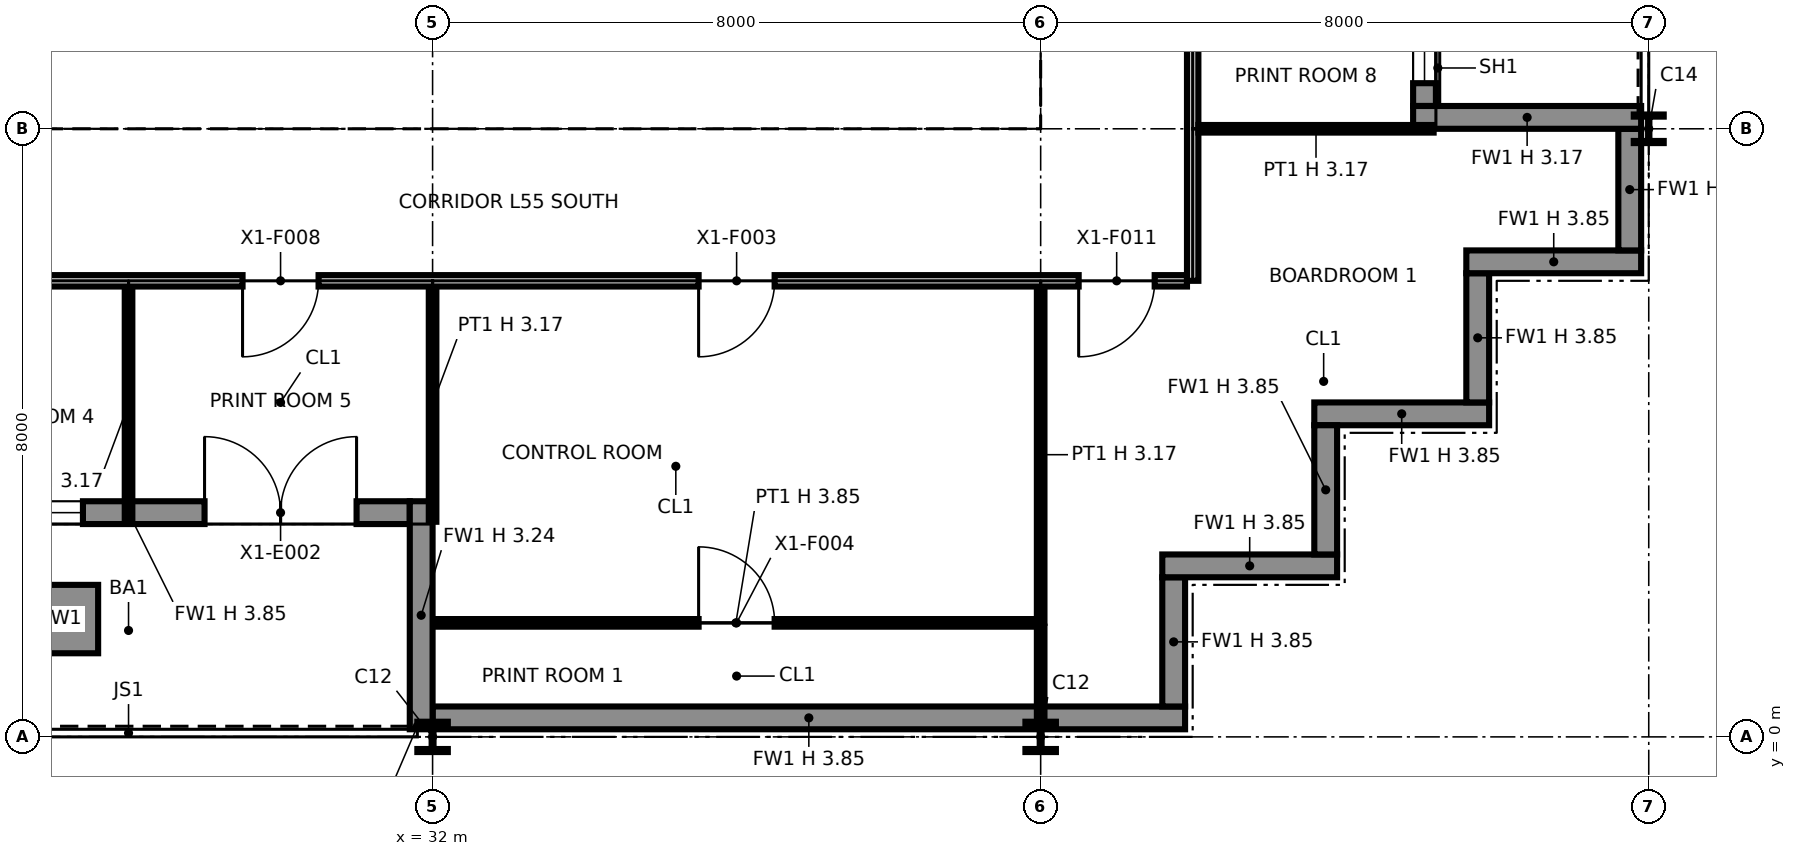
"""IFC4 building model, lengths in metres.
Left out: names, types, materials, properties, quantities, classifications, styles, units other than length and angle.
Written with IfcOpenShell. Run it as: python <this file> out.ifc"""

import sys

from ifc_helpers import new_model, si_unit, direction, frame, frame_2d, origin, origin_2d, place, context, subcontext, project, spatial, polyline, rectangle, i_section, outline, extrude, element, fill, save


model = new_model("IFC4")
c1 = context("Model", 3, precision=1e-05, world=origin(), true_north=direction((0.0, 1.0)))
c2 = subcontext(c1, "Body", "Model", "MODEL_VIEW")
j1 = project(units=[si_unit("LENGTHUNIT", "METRE"), si_unit("PLANEANGLEUNIT", "RADIAN")], contexts=[c1])
p1 = place(None, origin())
s1 = spatial("IfcSite", under=j1, at=p1, CompositionType="ELEMENT")
p2 = place(p1, origin())
s2 = spatial("IfcBuilding", under=s1, at=p2, CompositionType="ELEMENT")
p3 = place(p2, frame((0.0, 0.0, 255.0)))
s3 = spatial("IfcBuildingStorey", under=s2, at=p3, CompositionType="ELEMENT", Elevation=255.0)
p4 = place(p3, frame((32.0, 0.0, 0.0), z_axis=(0.0, 0.0, 1.0), x_axis=(1.0, 0.0, 0.0)))
e1 = element("IfcColumn", 1, at=p4, inside=s3, PredefinedType="COLUMN", context=c2, shape_type="SweptSolid", body=[
    extrude(i_section(OverallWidth=0.401, OverallDepth=0.399, WebThickness=0.025, FlangeThickness=0.04, at=origin_2d()), origin(), (0.0, 0.0, 1.0), 3.85),
])
p5 = place(p3, frame((32.0, 8.0, 0.0), z_axis=(0.0, 0.0, 1.0), x_axis=(1.0, 0.0, 0.0)))
e2 = element("IfcColumn", 2, at=p5, inside=s3, PredefinedType="COLUMN", context=c2, shape_type="SweptSolid", body=[
    extrude(i_section(OverallWidth=0.371, OverallDepth=0.361, WebThickness=0.012, FlangeThickness=0.02, at=origin_2d()), origin(), (0.0, 0.0, 1.0), 3.85),
])
p6 = place(p3, frame((40.0, 0.0, 0.0), z_axis=(0.0, 0.0, 1.0), x_axis=(1.0, 0.0, 0.0)))
e3 = element("IfcColumn", 3, at=p6, inside=s3, PredefinedType="COLUMN", context=c2, shape_type="SweptSolid", body=[
    extrude(i_section(OverallWidth=0.401, OverallDepth=0.399, WebThickness=0.025, FlangeThickness=0.04, at=origin_2d()), origin(), (0.0, 0.0, 1.0), 3.85),
])
p7 = place(p3, frame((40.0, 8.0, 0.0), z_axis=(0.0, 0.0, 1.0), x_axis=(1.0, 0.0, 0.0)))
e4 = element("IfcColumn", 4, at=p7, inside=s3, PredefinedType="COLUMN", context=c2, shape_type="SweptSolid", body=[
    extrude(i_section(OverallWidth=0.371, OverallDepth=0.361, WebThickness=0.012, FlangeThickness=0.02, at=origin_2d()), origin(), (0.0, 0.0, 1.0), 3.85),
])
p8 = place(p3, frame((48.0, 8.0, 0.0), z_axis=(0.0, 0.0, 1.0), x_axis=(1.0, 0.0, 0.0)))
e5 = element("IfcColumn", 5, at=p8, inside=s3, PredefinedType="COLUMN", context=c2, shape_type="SweptSolid", body=[
    extrude(i_section(OverallWidth=0.394, OverallDepth=0.376, WebThickness=0.017, FlangeThickness=0.028, at=origin_2d()), origin(), (0.0, 0.0, 1.0), 3.85),
])
p9 = place(p3, frame((24.3, 2.95, 0.0), z_axis=(0.0, 0.0, 1.0), x_axis=(1.0, 0.0, 0.0)))
e6 = element("IfcWall", 6, at=p9, inside=s3, PredefinedType="SOLIDWALL", context=c2, shape_type="SweptSolid", body=[
    extrude(rectangle(XDim=7.4, YDim=0.3, at=frame_2d((3.7, 0.0))), origin(), (0.0, 0.0, 1.0), 3.85),
])
p10 = place(p9, frame((0.3, 0.0, 0.9)))
e7 = element("IfcOpeningElement", 7, at=p10, cuts=e6, PredefinedType="OPENING", context=c2, shape_type="SweptSolid", body=[
    extrude(rectangle(XDim=2.8, YDim=2.2, at=frame_2d((1.4, 1.1))), frame((0.0, 0.16, 0.0), z_axis=(0.0, -1.0, 0.0), x_axis=(1.0, 0.0, 0.0)), (0.0, 0.0, 1.0), 0.32),
])
p11 = place(p9, frame((4.7, 0.0, 0.0)))
e8 = element("IfcOpeningElement", 8, at=p11, cuts=e6, PredefinedType="OPENING", context=c2, shape_type="SweptSolid", body=[
    extrude(rectangle(XDim=2.0, YDim=2.4, at=frame_2d((1.0, 1.2))), frame((0.0, 0.16, 0.0), z_axis=(0.0, -1.0, 0.0), x_axis=(1.0, 0.0, 0.0)), (0.0, 0.0, 1.0), 0.32),
])
p12 = place(p3, frame((31.85, 0.1, 0.0), z_axis=(0.0, 0.0, 1.0), x_axis=(0.0, 1.0, 0.0)))
e9 = element("IfcWall", 9, at=p12, inside=s3, PredefinedType="SOLIDWALL", context=c2, shape_type="SweptSolid", body=[
    extrude(rectangle(XDim=3.0, YDim=0.3, at=frame_2d((1.5, 0.0))), origin(), (0.0, 0.0, 1.0), 3.237),
])
p13 = place(p3, frame((32.0, 0.25, 0.0), z_axis=(0.0, 0.0, 1.0), x_axis=(1.0, 0.0, 0.0)))
e10 = element("IfcWall", 10, at=p13, inside=s3, PredefinedType="SOLIDWALL", context=c2, shape_type="SweptSolid", body=[
    extrude(rectangle(XDim=9.9, YDim=0.3, at=frame_2d((4.95, 0.0))), origin(), (0.0, 0.0, 1.0), 3.85),
])
p14 = place(p3, frame((24.4, 1.55, 0.0), z_axis=(0.0, 0.0, 1.0), x_axis=(1.0, 0.0, 0.0)))
e11 = element("IfcWall", 11, at=p14, inside=s3, PredefinedType="SOLIDWALL", context=c2, shape_type="SweptSolid", body=[
    extrude(rectangle(XDim=3.2, YDim=0.9, at=frame_2d((1.6, 0.0))), origin(), (0.0, 0.0, 1.0), 0.6),
])
p15 = place(p3, frame((41.75, 0.4, 0.0), z_axis=(0.0, 0.0, 1.0), x_axis=(0.0, 1.0, 0.0)))
e12 = element("IfcWall", 12, at=p15, inside=s3, PredefinedType="SOLIDWALL", context=c2, shape_type="SweptSolid", body=[
    extrude(rectangle(XDim=1.7, YDim=0.3, at=frame_2d((0.85, 0.0))), origin(), (0.0, 0.0, 1.0), 3.85),
])
p16 = place(p3, frame((41.6, 2.25, 0.0), z_axis=(0.0, 0.0, 1.0), x_axis=(1.0, 0.0, 0.0)))
e13 = element("IfcWall", 13, at=p16, inside=s3, PredefinedType="SOLIDWALL", context=c2, shape_type="SweptSolid", body=[
    extrude(rectangle(XDim=2.3, YDim=0.3, at=frame_2d((1.15, 0.0))), origin(), (0.0, 0.0, 1.0), 3.85),
])
p17 = place(p3, frame((43.75, 2.4, 0.0), z_axis=(0.0, 0.0, 1.0), x_axis=(0.0, 1.0, 0.0)))
e14 = element("IfcWall", 14, at=p17, inside=s3, PredefinedType="SOLIDWALL", context=c2, shape_type="SweptSolid", body=[
    extrude(rectangle(XDim=1.7, YDim=0.3, at=frame_2d((0.85, 0.0))), origin(), (0.0, 0.0, 1.0), 3.85),
])
p18 = place(p3, frame((43.6, 4.25, 0.0), z_axis=(0.0, 0.0, 1.0), x_axis=(1.0, 0.0, 0.0)))
e15 = element("IfcWall", 15, at=p18, inside=s3, PredefinedType="SOLIDWALL", context=c2, shape_type="SweptSolid", body=[
    extrude(rectangle(XDim=2.3, YDim=0.3, at=frame_2d((1.15, 0.0))), origin(), (0.0, 0.0, 1.0), 3.85),
])
p19 = place(p3, frame((45.75, 4.4, 0.0), z_axis=(0.0, 0.0, 1.0), x_axis=(0.0, 1.0, 0.0)))
e16 = element("IfcWall", 16, at=p19, inside=s3, PredefinedType="SOLIDWALL", context=c2, shape_type="SweptSolid", body=[
    extrude(rectangle(XDim=1.7, YDim=0.3, at=frame_2d((0.85, 0.0))), origin(), (0.0, 0.0, 1.0), 3.85),
])
p20 = place(p3, frame((45.6, 6.25, 0.0), z_axis=(0.0, 0.0, 1.0), x_axis=(1.0, 0.0, 0.0)))
e17 = element("IfcWall", 17, at=p20, inside=s3, PredefinedType="SOLIDWALL", context=c2, shape_type="SweptSolid", body=[
    extrude(rectangle(XDim=2.3, YDim=0.3, at=frame_2d((1.15, 0.0))), origin(), (0.0, 0.0, 1.0), 3.85),
])
p21 = place(p3, frame((47.75, 6.4, 0.0), z_axis=(0.0, 0.0, 1.0), x_axis=(0.0, 1.0, 0.0)))
e18 = element("IfcWall", 18, at=p21, inside=s3, PredefinedType="SOLIDWALL", context=c2, shape_type="SweptSolid", body=[
    extrude(rectangle(XDim=1.6, YDim=0.3, at=frame_2d((0.8, 0.0))), origin(), (0.0, 0.0, 1.0), 3.85),
])
p22 = place(p3, frame((45.05, 8.3, 0.0), z_axis=(0.0, 0.0, 1.0), x_axis=(0.0, 1.0, 0.0)))
e19 = element("IfcWall", 19, at=p22, inside=s3, PredefinedType="SOLIDWALL", context=c2, shape_type="SweptSolid", body=[
    extrude(rectangle(XDim=7.4, YDim=0.3, at=frame_2d((3.7, 0.0))), origin(), (0.0, 0.0, 1.0), 3.85),
])
p23 = place(p22, frame((0.3, 0.0, 0.9)))
e20 = element("IfcOpeningElement", 20, at=p23, cuts=e19, PredefinedType="OPENING", context=c2, shape_type="SweptSolid", body=[
    extrude(rectangle(XDim=2.8, YDim=2.2, at=frame_2d((1.4, 1.1))), frame((0.0, 0.16, 0.0), z_axis=(0.0, -1.0, 0.0), x_axis=(1.0, 0.0, 0.0)), (0.0, 0.0, 1.0), 0.32),
])
p24 = place(p22, frame((4.7, 0.0, 0.0)))
e21 = element("IfcOpeningElement", 21, at=p24, cuts=e19, PredefinedType="OPENING", context=c2, shape_type="SweptSolid", body=[
    extrude(rectangle(XDim=2.0, YDim=2.4, at=frame_2d((1.0, 1.2))), frame((0.0, 0.16, 0.0), z_axis=(0.0, -1.0, 0.0), x_axis=(1.0, 0.0, 0.0)), (0.0, 0.0, 1.0), 0.32),
])
p25 = place(p3, frame((47.9, 8.15, 0.0), z_axis=(0.0, 0.0, 1.0), x_axis=(-1.0, 0.0, 0.0)))
e22 = element("IfcWall", 22, at=p25, inside=s3, PredefinedType="SOLIDWALL", context=c2, shape_type="SweptSolid", body=[
    extrude(rectangle(XDim=3.0, YDim=0.3, at=frame_2d((1.5, 0.0))), origin(), (0.0, 0.0, 1.0), 3.171),
])
p26 = place(p3, frame((24.65, 8.75, 0.0), z_axis=(0.0, 0.0, 1.0), x_axis=(1.0, 0.0, 0.0)))
e23 = element("IfcWall", 23, at=p26, inside=s3, PredefinedType="PARTITIONING", context=c2, shape_type="SweptSolid", body=[
    extrude(outline(polyline([(0.0, 0.0), (14.7, 0.0), (14.7, 3.85), (7.438, 3.85), (7.438, 3.308), (7.262, 3.308), (7.261, 3.85), (0.0, 3.85), (0.0, 0.0)])), frame((0.0, 0.1, 0.0), z_axis=(0.0, -1.0, 0.0), x_axis=(1.0, 0.0, 0.0)), (0.0, 0.0, 1.0), 0.2),
])
for number, where, z_axis, x_axis in (
    (24, (27.2, 8.85, 0.0), (0.0, 0.0, 1.0), (0.0, 1.0, 0.0)),
    (25, (29.5, 8.85, 0.0), (0.0, 0.0, 1.0), (0.0, 1.0, 0.0)),
):
    element("IfcWall", number, at=place(p3, frame(where, z_axis=z_axis, x_axis=x_axis)), inside=s3, PredefinedType="PARTITIONING", context=c2, shape_type="SweptSolid", body=[
        extrude(rectangle(XDim=2.55, YDim=0.2, at=frame_2d((1.275, 0.0))), origin(), (0.0, 0.0, 1.0), 3.85),
    ])
p27 = place(p3, frame((32.0, 8.85, 0.0), z_axis=(0.0, 0.0, 1.0), x_axis=(0.0, 1.0, 0.0)))
e26 = element("IfcWall", 26, at=p27, inside=s3, PredefinedType="PARTITIONING", context=c2, shape_type="SweptSolid", body=[
    extrude(rectangle(XDim=2.55, YDim=0.6, at=frame_2d((1.275, 0.0))), origin(), (0.0, 0.0, 1.0), 3.308),
])
for number, where, z_axis, x_axis in (
    (27, (35.6, 8.85, 0.0), (0.0, 0.0, 1.0), (0.0, 1.0, 0.0)),
    (28, (39.25, 8.85, 0.0), (0.0, 0.0, 1.0), (0.0, 1.0, 0.0)),
):
    element("IfcWall", number, at=place(p3, frame(where, z_axis=z_axis, x_axis=x_axis)), inside=s3, PredefinedType="PARTITIONING", context=c2, shape_type="SweptSolid", body=[
        extrude(rectangle(XDim=6.3, YDim=0.2, at=frame_2d((3.15, 0.0))), origin(), (0.0, 0.0, 1.0), 3.85),
    ])
p28 = place(p3, frame((40.0, 0.13, 0.0), z_axis=(0.0, 0.0, 1.0), x_axis=(0.0, 1.0, 0.0)))
e29 = element("IfcWall", 29, at=p28, inside=s3, PredefinedType="PARTITIONING", context=c2, shape_type="SweptSolid", body=[
    extrude(rectangle(XDim=1.32, YDim=0.1, at=frame_2d((0.66, 0.0))), origin(), (0.0, 0.0, 1.0), 3.172),
])
p29 = place(p3, frame((32.03, 1.5, 0.0), z_axis=(0.0, 0.0, 1.0), x_axis=(1.0, 0.0, 0.0)))
e30 = element("IfcWall", 30, at=p29, inside=s3, PredefinedType="PARTITIONING", context=c2, shape_type="SweptSolid", body=[
    extrude(rectangle(XDim=7.92, YDim=0.1, at=frame_2d((3.96, 0.0))), origin(), (0.0, 0.0, 1.0), 3.85),
])
p30 = place(p29, frame((3.47, 0.0, 0.0)))
e31 = element("IfcOpeningElement", 31, at=p30, cuts=e30, PredefinedType="OPENING", context=c2, shape_type="SweptSolid", body=[
    extrude(rectangle(XDim=1.0, YDim=2.1, at=frame_2d((0.5, 1.05))), frame((0.0, 0.06, 0.0), z_axis=(0.0, -1.0, 0.0), x_axis=(1.0, 0.0, 0.0)), (0.0, 0.0, 1.0), 0.12),
])
p31 = place(p3, frame((40.0, 1.5, 0.0), z_axis=(0.0, 0.0, 1.0), x_axis=(0.0, 1.0, 0.0)))
e32 = element("IfcWall", 32, at=p31, inside=s3, PredefinedType="PARTITIONING", context=c2, shape_type="SweptSolid", body=[
    extrude(rectangle(XDim=4.425, YDim=0.1, at=frame_2d((2.212, 0.0))), origin(), (0.0, 0.0, 1.0), 3.172),
])
for number, where, z_axis, x_axis in (
    (33, (28.0, 2.83, 0.0), (0.0, 0.0, 1.0), (0.0, 1.0, 0.0)),
    (34, (32.0, 2.83, 0.0), (0.0, 0.0, 1.0), (0.0, 1.0, 0.0)),
):
    element("IfcWall", number, at=place(p3, frame(where, z_axis=z_axis, x_axis=x_axis)), inside=s3, PredefinedType="PARTITIONING", context=c2, shape_type="SweptSolid", body=[
        extrude(rectangle(XDim=3.095, YDim=0.1, at=frame_2d((1.547, 0.0))), origin(), (0.0, 0.0, 1.0), 3.172),
    ])
p32 = place(p3, frame((6.075, 6.0, 0.0), z_axis=(0.0, 0.0, 1.0), x_axis=(1.0, 0.0, 0.0)))
e35 = element("IfcWall", 35, at=p32, inside=s3, PredefinedType="PARTITIONING", context=c2, shape_type="SweptSolid", body=[
    extrude(rectangle(XDim=35.85, YDim=0.15, at=frame_2d((17.925, 0.0))), origin(), (0.0, 0.0, 1.0), 3.85),
])
p33 = place(p32, frame((14.425, 0.0, 0.0), z_axis=(0.0, 0.0, 1.0), x_axis=(-1.0, 0.0, 0.0)))
e36 = element("IfcOpeningElement", 36, at=p33, cuts=e35, PredefinedType="OPENING", context=c2, shape_type="SweptSolid", body=[
    extrude(rectangle(XDim=1.0, YDim=2.1, at=frame_2d((0.5, 1.05))), frame((0.0, 0.085, 0.0), z_axis=(0.0, -1.0, 0.0), x_axis=(1.0, 0.0, 0.0)), (0.0, 0.0, 1.0), 0.17),
])
p34 = place(p32, frame((30.425, 0.0, 0.0), z_axis=(0.0, 0.0, 1.0), x_axis=(-1.0, 0.0, 0.0)))
e37 = element("IfcOpeningElement", 37, at=p34, cuts=e35, PredefinedType="OPENING", context=c2, shape_type="SweptSolid", body=[
    extrude(rectangle(XDim=1.0, YDim=2.1, at=frame_2d((0.5, 1.05))), frame((0.0, 0.085, 0.0), z_axis=(0.0, -1.0, 0.0), x_axis=(1.0, 0.0, 0.0)), (0.0, 0.0, 1.0), 0.17),
])
p35 = place(p32, frame((4.425, 0.0, 0.0), z_axis=(0.0, 0.0, 1.0), x_axis=(-1.0, 0.0, 0.0)))
e38 = element("IfcOpeningElement", 38, at=p35, cuts=e35, PredefinedType="OPENING", context=c2, shape_type="SweptSolid", body=[
    extrude(rectangle(XDim=1.0, YDim=2.1, at=frame_2d((0.5, 1.05))), frame((0.0, 0.085, 0.0), z_axis=(0.0, -1.0, 0.0), x_axis=(1.0, 0.0, 0.0)), (0.0, 0.0, 1.0), 0.17),
])
p36 = place(p32, frame((8.425, 0.0, 0.0), z_axis=(0.0, 0.0, 1.0), x_axis=(-1.0, 0.0, 0.0)))
e39 = element("IfcOpeningElement", 39, at=p36, cuts=e35, PredefinedType="OPENING", context=c2, shape_type="SweptSolid", body=[
    extrude(rectangle(XDim=1.0, YDim=2.1, at=frame_2d((0.5, 1.05))), frame((0.0, 0.085, 0.0), z_axis=(0.0, -1.0, 0.0), x_axis=(1.0, 0.0, 0.0)), (0.0, 0.0, 1.0), 0.17),
])
p37 = place(p32, frame((19.425, 0.0, 0.0), z_axis=(0.0, 0.0, 1.0), x_axis=(-1.0, 0.0, 0.0)))
e40 = element("IfcOpeningElement", 40, at=p37, cuts=e35, PredefinedType="OPENING", context=c2, shape_type="SweptSolid", body=[
    extrude(rectangle(XDim=1.0, YDim=2.1, at=frame_2d((0.5, 1.05))), frame((0.0, 0.085, 0.0), z_axis=(0.0, -1.0, 0.0), x_axis=(1.0, 0.0, 0.0)), (0.0, 0.0, 1.0), 0.17),
])
p38 = place(p32, frame((24.425, 0.0, 0.0), z_axis=(0.0, 0.0, 1.0), x_axis=(-1.0, 0.0, 0.0)))
e41 = element("IfcOpeningElement", 41, at=p38, cuts=e35, PredefinedType="OPENING", context=c2, shape_type="SweptSolid", body=[
    extrude(rectangle(XDim=1.0, YDim=2.1, at=frame_2d((0.5, 1.05))), frame((0.0, 0.085, 0.0), z_axis=(0.0, -1.0, 0.0), x_axis=(1.0, 0.0, 0.0)), (0.0, 0.0, 1.0), 0.17),
])
p39 = place(p32, frame((35.425, 0.0, 0.0), z_axis=(0.0, 0.0, 1.0), x_axis=(-1.0, 0.0, 0.0)))
e42 = element("IfcOpeningElement", 42, at=p39, cuts=e35, PredefinedType="OPENING", context=c2, shape_type="SweptSolid", body=[
    extrude(rectangle(XDim=1.0, YDim=2.1, at=frame_2d((0.5, 1.05))), frame((0.0, 0.085, 0.0), z_axis=(0.0, -1.0, 0.0), x_axis=(1.0, 0.0, 0.0)), (0.0, 0.0, 1.0), 0.17),
])
p40 = place(p3, frame((42.0, 6.0, 0.0), z_axis=(0.0, 0.0, 1.0), x_axis=(0.0, 1.0, 0.0)))
e43 = element("IfcWall", 43, at=p40, inside=s3, PredefinedType="PARTITIONING", context=c2, shape_type="SweptSolid", body=[
    extrude(outline(polyline([(0.0, 0.0), (11.925, 0.0), (11.925, 3.85), (10.3, 3.85), (10.298, 3.172), (9.702, 3.172), (9.7, 3.85), (6.3, 3.85), (6.298, 3.172), (5.702, 3.172), (5.7, 3.85), (2.3, 3.85), (2.298, 3.172), (1.702, 3.172), (1.7, 3.85), (0.0, 3.85), (0.0, 0.0)])), frame((0.0, 0.075, 0.0), z_axis=(0.0, -1.0, 0.0), x_axis=(1.0, 0.0, 0.0)), (0.0, 0.0, 1.0), 0.15),
])
p41 = place(p40, frame((4.5, 0.0, 0.0), z_axis=(0.0, 0.0, 1.0), x_axis=(-1.0, 0.0, 0.0)))
e44 = element("IfcOpeningElement", 44, at=p41, cuts=e43, PredefinedType="OPENING", context=c2, shape_type="SweptSolid", body=[
    extrude(rectangle(XDim=1.0, YDim=2.1, at=frame_2d((0.5, 1.05))), frame((0.0, 0.085, 0.0), z_axis=(0.0, -1.0, 0.0), x_axis=(1.0, 0.0, 0.0)), (0.0, 0.0, 1.0), 0.17),
])
p42 = place(p40, frame((8.5, 0.0, 0.0), z_axis=(0.0, 0.0, 1.0), x_axis=(-1.0, 0.0, 0.0)))
e45 = element("IfcOpeningElement", 45, at=p42, cuts=e43, PredefinedType="OPENING", context=c2, shape_type="SweptSolid", body=[
    extrude(rectangle(XDim=1.0, YDim=2.1, at=frame_2d((0.5, 1.05))), frame((0.0, 0.085, 0.0), z_axis=(0.0, -1.0, 0.0), x_axis=(1.0, 0.0, 0.0)), (0.0, 0.0, 1.0), 0.17),
])
p43 = place(p40, frame((11.5, 0.0, 0.0), z_axis=(0.0, 0.0, 1.0), x_axis=(-1.0, 0.0, 0.0)))
e46 = element("IfcOpeningElement", 46, at=p43, cuts=e43, PredefinedType="OPENING", context=c2, shape_type="SweptSolid", body=[
    extrude(rectangle(XDim=1.0, YDim=2.1, at=frame_2d((0.5, 1.05))), frame((0.0, 0.085, 0.0), z_axis=(0.0, -1.0, 0.0), x_axis=(1.0, 0.0, 0.0)), (0.0, 0.0, 1.0), 0.17),
])
p44 = place(p3, frame((42.075, 8.0, 0.0), z_axis=(0.0, 0.0, 1.0), x_axis=(1.0, 0.0, 0.0)))
e47 = element("IfcWall", 47, at=p44, inside=s3, PredefinedType="PARTITIONING", context=c2, shape_type="SweptSolid", body=[
    extrude(rectangle(XDim=3.095, YDim=0.1, at=frame_2d((1.547, 0.0))), origin(), (0.0, 0.0, 1.0), 3.172),
])
p45 = place(p10, origin())
e48 = element("IfcWindow", 48, at=p45, inside=s3, PartitioningType="SINGLE_PANEL", PredefinedType="WINDOW", context=c2, shape_type="SweptSolid", body=[
    extrude(rectangle(XDim=2.8, YDim=2.2, at=frame_2d((1.4, 1.1))), frame((0.0, 0.03, 0.0), z_axis=(0.0, -1.0, 0.0), x_axis=(1.0, 0.0, 0.0)), (0.0, 0.0, 1.0), 0.06),
])
fill(e7, e48)
p46 = place(p11, origin())
e49 = element("IfcDoor", 49, at=p46, inside=s3, OperationType="DOUBLE_DOOR_SINGLE_SWING", PredefinedType="DOOR", context=c2, shape_type="SweptSolid", body=[
    extrude(rectangle(XDim=2.0, YDim=2.4, at=frame_2d((1.0, 1.2))), frame((0.0, 0.025, 0.0), z_axis=(0.0, -1.0, 0.0), x_axis=(1.0, 0.0, 0.0)), (0.0, 0.0, 1.0), 0.05),
])
fill(e8, e49)
p47 = place(p23, origin())
e50 = element("IfcWindow", 50, at=p47, inside=s3, PartitioningType="SINGLE_PANEL", PredefinedType="WINDOW", context=c2, shape_type="SweptSolid", body=[
    extrude(rectangle(XDim=2.8, YDim=2.2, at=frame_2d((1.4, 1.1))), frame((0.0, 0.03, 0.0), z_axis=(0.0, -1.0, 0.0), x_axis=(1.0, 0.0, 0.0)), (0.0, 0.0, 1.0), 0.06),
])
fill(e20, e50)
p48 = place(p34, origin())
e51 = element("IfcDoor", 51, at=p48, inside=s3, OperationType="SINGLE_SWING_RIGHT", PredefinedType="DOOR", context=c2, shape_type="SweptSolid", body=[
    extrude(rectangle(XDim=1.0, YDim=2.1, at=frame_2d((0.5, 1.05))), frame((0.0, 0.025, 0.0), z_axis=(0.0, -1.0, 0.0), x_axis=(1.0, 0.0, 0.0)), (0.0, 0.0, 1.0), 0.05),
])
fill(e37, e51)
p49 = place(p30, origin())
e52 = element("IfcDoor", 52, at=p49, inside=s3, OperationType="SINGLE_SWING_LEFT", PredefinedType="DOOR", context=c2, shape_type="SweptSolid", body=[
    extrude(rectangle(XDim=1.0, YDim=2.1, at=frame_2d((0.5, 1.05))), frame((0.0, 0.025, 0.0), z_axis=(0.0, -1.0, 0.0), x_axis=(1.0, 0.0, 0.0)), (0.0, 0.0, 1.0), 0.05),
])
fill(e31, e52)
p50 = place(p38, origin())
e53 = element("IfcDoor", 53, at=p50, inside=s3, OperationType="SINGLE_SWING_RIGHT", PredefinedType="DOOR", context=c2, shape_type="SweptSolid", body=[
    extrude(rectangle(XDim=1.0, YDim=2.1, at=frame_2d((0.5, 1.05))), frame((0.0, 0.025, 0.0), z_axis=(0.0, -1.0, 0.0), x_axis=(1.0, 0.0, 0.0)), (0.0, 0.0, 1.0), 0.05),
])
fill(e41, e53)
p51 = place(p39, origin())
e54 = element("IfcDoor", 54, at=p51, inside=s3, OperationType="SINGLE_SWING_RIGHT", PredefinedType="DOOR", context=c2, shape_type="SweptSolid", body=[
    extrude(rectangle(XDim=1.0, YDim=2.1, at=frame_2d((0.5, 1.05))), frame((0.0, 0.025, 0.0), z_axis=(0.0, -1.0, 0.0), x_axis=(1.0, 0.0, 0.0)), (0.0, 0.0, 1.0), 0.05),
])
fill(e42, e54)
save(model, sys.argv[1])
